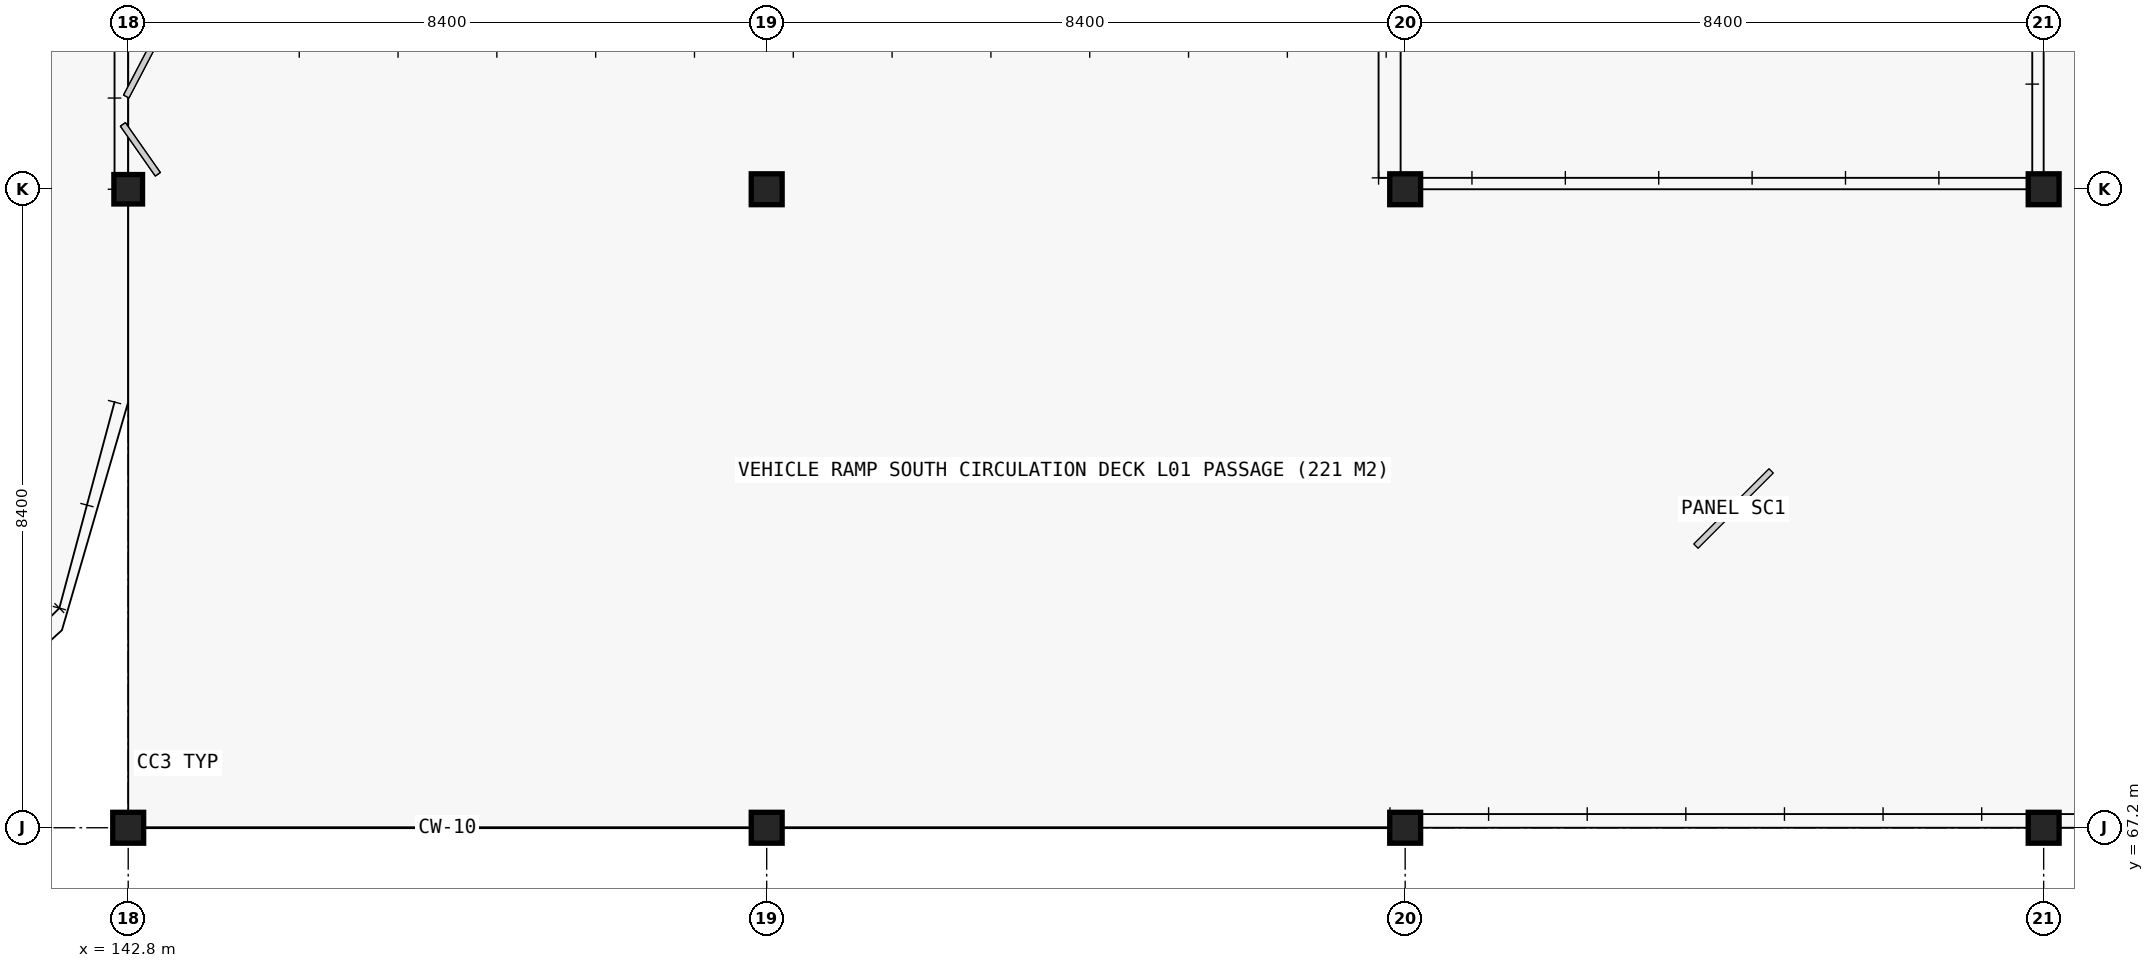
"""IFC4 building model, lengths in metres.
Left out: names, types, materials, properties, quantities, classifications, styles, units other than length and angle.
Written with IfcOpenShell. Run it as: python <this file> out.ifc"""

import sys

from ifc_helpers import new_model, si_unit, direction, frame, origin, origin_2d, place, context, subcontext, project, spatial, hollow_circle, i_section, extrude, element, save


model = new_model("IFC4")
c1 = context("Model", 3, precision=1e-05, world=origin(), true_north=direction((0.0, 1.0)))
c2 = subcontext(c1, "Body", "Model", "MODEL_VIEW")
j1 = project(units=[si_unit("LENGTHUNIT", "METRE"), si_unit("PLANEANGLEUNIT", "RADIAN")], contexts=[c1])
p1 = place(None, origin())
s1 = spatial("IfcSite", under=j1, at=p1, CompositionType="ELEMENT")
p2 = place(p1, origin())
s2 = spatial("IfcBuilding", under=s1, at=p2, CompositionType="ELEMENT")
p3 = place(p2, frame((0.0, 0.0, 4.8)))
s3 = spatial("IfcBuildingStorey", under=s2, at=p3, CompositionType="ELEMENT", Elevation=4.8)
p4 = place(p3, frame((142.8, 67.2, 0.0), z_axis=(0.0, 0.0, 1.0), x_axis=(1.0, 0.0, 0.0)))
e1 = element("IfcColumn", 1, at=p4, inside=s3, PredefinedType="COLUMN", context=c2, shape_type="SweptSolid", body=[
    extrude(hollow_circle(Radius=0.203, WallThickness=0.012, at=origin_2d()), origin(), (0.0, 0.0, 1.0), 4.2),
])
p5 = place(p3, frame((142.8, 75.6, 0.0), z_axis=(0.0, 0.0, 1.0), x_axis=(1.0, 0.0, 0.0)))
e2 = element("IfcColumn", 2, at=p5, inside=s3, PredefinedType="COLUMN", context=c2, shape_type="SweptSolid", body=[
    extrude(i_section(OverallWidth=0.377, OverallDepth=0.387, WebThickness=0.022, FlangeThickness=0.036, FilletRadius=0.015, at=origin_2d()), origin(), (0.0, 0.0, 1.0), 4.2),
])
for number, where, z_axis, x_axis in (
    (3, (151.2, 67.2, 0.0), (0.0, 0.0, 1.0), (1.0, 0.0, 0.0)),
    (4, (151.2, 75.6, 0.0), (0.0, 0.0, 1.0), (1.0, 0.0, 0.0)),
    (5, (159.6, 67.2, 0.0), (0.0, 0.0, 1.0), (1.0, 0.0, 0.0)),
    (6, (159.6, 75.6, 0.0), (0.0, 0.0, 1.0), (1.0, 0.0, 0.0)),
    (7, (168.0, 67.2, 0.0), (0.0, 0.0, 1.0), (1.0, 0.0, 0.0)),
    (8, (168.0, 75.6, 0.0), (0.0, 0.0, 1.0), (1.0, 0.0, 0.0)),
):
    element("IfcColumn", number, at=place(p3, frame(where, z_axis=z_axis, x_axis=x_axis)), inside=s3, PredefinedType="COLUMN", context=c2, shape_type="SweptSolid", body=[
        extrude(hollow_circle(Radius=0.203, WallThickness=0.012, at=origin_2d()), origin(), (0.0, 0.0, 1.0), 4.2),
    ])
save(model, sys.argv[1])
